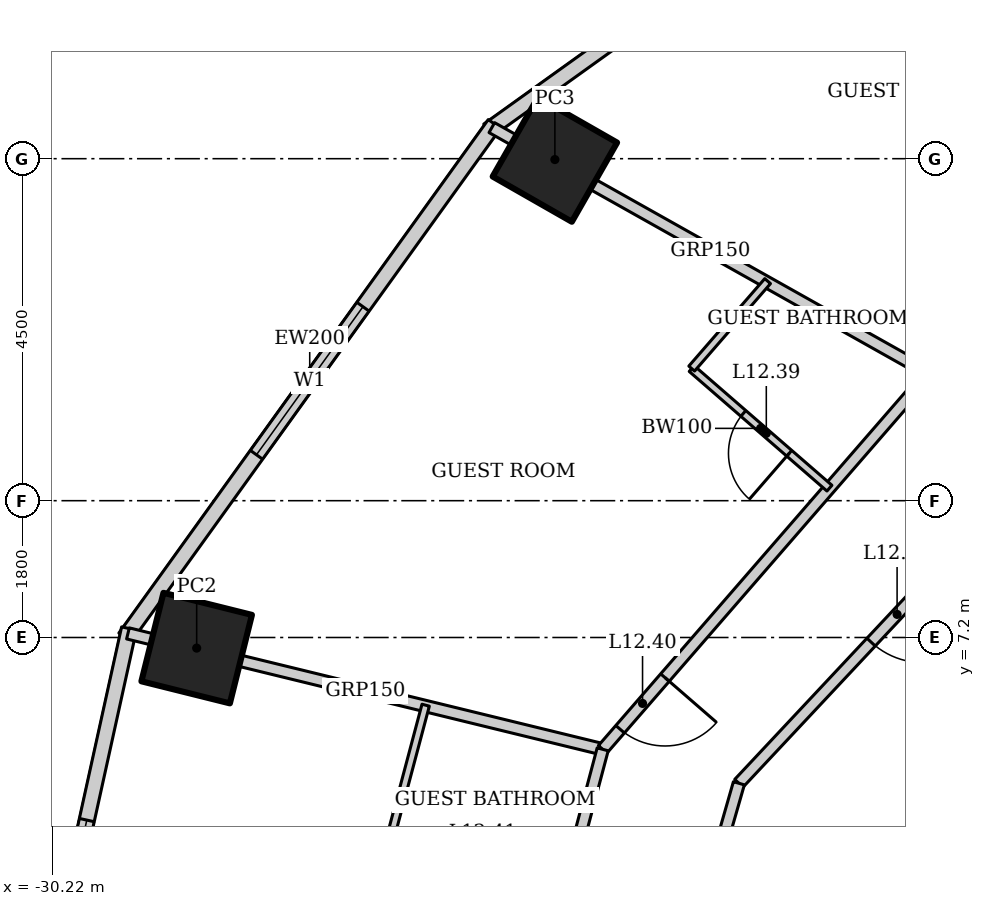
"""IFC4 building model, lengths in metres.
Left out: names, types, materials, properties, quantities, classifications, styles, units other than length and angle.
Written with IfcOpenShell. Run it as: python <this file> out.ifc"""

import sys

from ifc_helpers import new_model, si_unit, direction, frame, frame_2d, origin, origin_2d, place, context, subcontext, project, spatial, rectangle, hollow_rectangle, extrude, element, fill, save


model = new_model("IFC4")
c1 = context("Model", 3, precision=1e-05, world=origin(), true_north=direction((0.0, 1.0)))
c2 = subcontext(c1, "Body", "Model", "MODEL_VIEW")
j1 = project(units=[si_unit("LENGTHUNIT", "METRE"), si_unit("PLANEANGLEUNIT", "RADIAN")], contexts=[c1])
p1 = place(None, origin())
s1 = spatial("IfcSite", under=j1, at=p1, CompositionType="ELEMENT")
p2 = place(p1, origin())
s2 = spatial("IfcBuilding", under=s1, at=p2, CompositionType="ELEMENT")
p3 = place(p2, frame((0.0, 0.0, 58.6)))
s3 = spatial("IfcBuildingStorey", under=s2, at=p3, CompositionType="ELEMENT", Elevation=58.6)
p4 = place(p3, frame((-23.605, 13.489, 0.0), z_axis=(0.0, 0.0, 1.0), x_axis=(0.496139221777, 0.86824298017, 0.0)))
e1 = element("IfcColumn", 1, at=p4, inside=s3, PredefinedType="COLUMN", context=c2, shape_type="SweptSolid", body=[
    extrude(hollow_rectangle(XDim=1.2, YDim=1.2, WallThickness=0.12, at=origin_2d()), origin(), (0.0, 0.0, 1.0), 3.6),
])
p5 = place(p3, frame((-28.318, 7.06, 0.0), z_axis=(0.0, 0.0, 1.0), x_axis=(0.2419218956, 0.970295726276, 0.0)))
e2 = element("IfcColumn", 2, at=p5, inside=s3, PredefinedType="COLUMN", context=c2, shape_type="SweptSolid", body=[
    extrude(hollow_rectangle(XDim=1.2, YDim=1.2, WallThickness=0.1, at=origin_2d()), origin(), (0.0, 0.0, 1.0), 3.6),
])
p6 = place(p3, frame((-17.929, 18.572, 0.0), z_axis=(0.0, 0.0, 1.0), x_axis=(-0.812791321576, -0.582554948112, 0.0)))
e3 = element("IfcWall", 3, at=p6, inside=s3, PredefinedType="SOLIDWALL", context=c2, shape_type="SweptSolid", body=[
    extrude(rectangle(XDim=8.063, YDim=0.2, at=frame_2d((4.032, 0.0))), origin(), (0.0, 0.0, 1.0), 3.45),
])
p7 = place(p6, frame((2.832, 0.0, 0.5)))
e4 = element("IfcOpeningElement", 4, at=p7, cuts=e3, PredefinedType="OPENING", context=c2, shape_type="SweptSolid", body=[
    extrude(rectangle(XDim=2.4, YDim=2.2, at=frame_2d((1.2, 1.1))), frame((0.0, 0.11, 0.0), z_axis=(0.0, -1.0, 0.0), x_axis=(1.0, 0.0, 0.0)), (0.0, 0.0, 1.0), 0.22),
])
p8 = place(p3, frame((-24.4, 13.957, 0.0), z_axis=(0.0, 0.0, 1.0), x_axis=(-0.583937613703, -0.811798536155, 0.0)))
e5 = element("IfcWall", 5, at=p8, inside=s3, PredefinedType="SOLIDWALL", context=c2, shape_type="SweptSolid", body=[
    extrude(rectangle(XDim=8.323, YDim=0.2, at=frame_2d((4.162, 0.0))), origin(), (0.0, 0.0, 1.0), 3.45),
])
p9 = place(p8, frame((2.961, 0.0, 0.5)))
e6 = element("IfcOpeningElement", 6, at=p9, cuts=e5, PredefinedType="OPENING", context=c2, shape_type="SweptSolid", body=[
    extrude(rectangle(XDim=2.4, YDim=2.2, at=frame_2d((1.2, 1.1))), frame((0.0, 0.11, 0.0), z_axis=(0.0, -1.0, 0.0), x_axis=(1.0, 0.0, 0.0)), (0.0, 0.0, 1.0), 0.22),
])
p10 = place(p3, frame((-29.208, 7.318, 0.0), z_axis=(0.0, 0.0, 1.0), x_axis=(-0.215238065514, -0.976561608478, 0.0)))
e7 = element("IfcWall", 7, at=p10, inside=s3, PredefinedType="SOLIDWALL", context=c2, shape_type="SweptSolid", body=[
    extrude(rectangle(XDim=7.562, YDim=0.2, at=frame_2d((3.781, 0.0))), origin(), (0.0, 0.0, 1.0), 3.45),
])
p11 = place(p10, frame((2.581, 0.0, 0.5)))
e8 = element("IfcOpeningElement", 8, at=p11, cuts=e7, PredefinedType="OPENING", context=c2, shape_type="SweptSolid", body=[
    extrude(rectangle(XDim=2.4, YDim=2.2, at=frame_2d((1.2, 1.1))), frame((0.0, 0.11, 0.0), z_axis=(0.0, -1.0, 0.0), x_axis=(1.0, 0.0, 0.0)), (0.0, 0.0, 1.0), 0.22),
])
p12 = place(p3, frame((-24.435, 13.909, 0.0), z_axis=(0.0, 0.0, 1.0), x_axis=(0.871747379892, -0.489955616001, 0.0)))
e9 = element("IfcWall", 9, at=p12, inside=s3, PredefinedType="PARTITIONING", context=c2, shape_type="SweptSolid", body=[
    extrude(rectangle(XDim=6.6, YDim=0.15, at=frame_2d((3.3, 0.0))), origin(), (0.0, 0.0, 1.0), 2.693),
])
p13 = place(p3, frame((-29.222, 7.254, 0.0), z_axis=(0.0, 0.0, 1.0), x_axis=(0.971456980633, -0.237215797913, 0.0)))
e10 = element("IfcWall", 10, at=p13, inside=s3, PredefinedType="PARTITIONING", context=c2, shape_type="SweptSolid", body=[
    extrude(rectangle(XDim=6.429, YDim=0.15, at=frame_2d((3.215, 0.0))), origin(), (0.0, 0.0, 1.0), 2.332),
])
p14 = place(p3, frame((-18.681, 10.675, 0.0), z_axis=(0.0, 0.0, 1.0), x_axis=(-0.655599989166, -0.755108372491, 0.0)))
e11 = element("IfcWall", 11, at=p14, inside=s3, PredefinedType="PARTITIONING", context=c2, shape_type="SweptSolid", body=[
    extrude(rectangle(XDim=6.551, YDim=0.15, at=frame_2d((3.275, 0.0))), origin(), (0.0, 0.0, 1.0), 3.45),
])
p15 = place(p14, frame((5.301, 0.0, 0.0)))
e12 = element("IfcOpeningElement", 12, at=p15, cuts=e11, PredefinedType="OPENING", context=c2, shape_type="SweptSolid", body=[
    extrude(rectangle(XDim=0.9, YDim=2.1, at=frame_2d((0.45, 1.05))), frame((0.0, 0.085, 0.0), z_axis=(0.0, -1.0, 0.0), x_axis=(1.0, 0.0, 0.0)), (0.0, 0.0, 1.0), 0.17),
])
p16 = place(p3, frame((-22.976, 5.729, 0.0), z_axis=(0.0, 0.0, 1.0), x_axis=(-0.257083265334, -0.966389256296, 0.0)))
e13 = element("IfcWall", 13, at=p16, inside=s3, PredefinedType="PARTITIONING", context=c2, shape_type="SweptSolid", body=[
    extrude(rectangle(XDim=5.928, YDim=0.15, at=frame_2d((2.964, 0.0))), origin(), (0.0, 0.0, 1.0), 3.45),
])
p17 = place(p16, frame((4.023, 0.0, 0.0)))
e14 = element("IfcOpeningElement", 14, at=p17, cuts=e13, PredefinedType="OPENING", context=c2, shape_type="SweptSolid", body=[
    extrude(rectangle(XDim=0.9, YDim=2.1, at=frame_2d((0.45, 1.05))), frame((0.0, 0.085, 0.0), z_axis=(0.0, -1.0, 0.0), x_axis=(1.0, 0.0, 0.0)), (0.0, 0.0, 1.0), 0.17),
])
p18 = place(p3, frame((-17.021, 9.726, 0.0), z_axis=(0.0, 0.0, 1.0), x_axis=(-0.68365836236, -0.729802194828, 0.0)))
e15 = element("IfcWall", 15, at=p18, inside=s3, PredefinedType="PARTITIONING", context=c2, shape_type="SweptSolid", body=[
    extrude(rectangle(XDim=6.09, YDim=0.15, at=frame_2d((3.045, 0.0))), origin(), (0.0, 0.0, 1.0), 3.45),
])
p19 = place(p18, frame((2.545, 0.0, 0.0)))
e16 = element("IfcOpeningElement", 16, at=p19, cuts=e15, PredefinedType="OPENING", context=c2, shape_type="SweptSolid", body=[
    extrude(rectangle(XDim=1.0, YDim=2.1, at=frame_2d((0.5, 1.05))), frame((0.0, 0.085, 0.0), z_axis=(0.0, -1.0, 0.0), x_axis=(1.0, 0.0, 0.0)), (0.0, 0.0, 1.0), 0.17),
])
p20 = place(p3, frame((-21.184, 5.282, 0.0), z_axis=(0.0, 0.0, 1.0), x_axis=(-0.27585972825, -0.961197903831, 0.0)))
e17 = element("IfcWall", 17, at=p20, inside=s3, PredefinedType="PARTITIONING", context=c2, shape_type="SweptSolid", body=[
    extrude(rectangle(XDim=4.559, YDim=0.15, at=frame_2d((2.279, 0.0))), origin(), (0.0, 0.0, 1.0), 3.45),
])
p21 = place(p3, frame((-19.993, 9.165, 0.0), z_axis=(0.0, 0.0, 1.0), x_axis=(-0.755098052661, 0.655611875172, 0.0)))
e18 = element("IfcWall", 18, at=p21, inside=s3, PredefinedType="PARTITIONING", context=c2, shape_type="SweptSolid", body=[
    extrude(rectangle(XDim=2.4, YDim=0.1, at=frame_2d((1.2, 0.0))), origin(), (0.0, 0.0, 1.0), 3.45),
])
p22 = place(p21, frame((0.7, 0.0, 0.0)))
e19 = element("IfcOpeningElement", 19, at=p22, cuts=e18, PredefinedType="OPENING", context=c2, shape_type="SweptSolid", body=[
    extrude(rectangle(XDim=0.8, YDim=2.1, at=frame_2d((0.4, 1.05))), frame((0.0, 0.06, 0.0), z_axis=(0.0, -1.0, 0.0), x_axis=(1.0, 0.0, 0.0)), (0.0, 0.0, 1.0), 0.12),
])
p23 = place(p3, frame((-21.805, 10.738, 0.0), z_axis=(0.0, 0.0, 1.0), x_axis=(0.655528024617, 0.755170847518, 0.0)))
e20 = element("IfcWall", 20, at=p23, inside=s3, PredefinedType="PARTITIONING", context=c2, shape_type="SweptSolid", body=[
    extrude(rectangle(XDim=1.524, YDim=0.1, at=frame_2d((0.762, 0.0))), origin(), (0.0, 0.0, 1.0), 3.45),
])
p24 = place(p3, frame((-25.81, 4.413, 0.0), z_axis=(0.0, 0.0, 1.0), x_axis=(0.257143831715, 0.96637314212, 0.0)))
e21 = element("IfcWall", 21, at=p24, inside=s3, PredefinedType="PARTITIONING", context=c2, shape_type="SweptSolid", body=[
    extrude(rectangle(XDim=1.962, YDim=0.1, at=frame_2d((0.981, 0.0))), origin(), (0.0, 0.0, 1.0), 3.45),
])
p25 = place(p9, origin())
e22 = element("IfcWindow", 22, at=p25, inside=s3, PartitioningType="SINGLE_PANEL", PredefinedType="WINDOW", context=c2, shape_type="SweptSolid", body=[
    extrude(rectangle(XDim=2.4, YDim=2.2, at=frame_2d((1.2, 1.1))), frame((0.0, 0.03, 0.0), z_axis=(0.0, -1.0, 0.0), x_axis=(1.0, 0.0, 0.0)), (0.0, 0.0, 1.0), 0.06),
])
fill(e6, e22)
p26 = place(p11, origin())
e23 = element("IfcWindow", 23, at=p26, inside=s3, PartitioningType="SINGLE_PANEL", PredefinedType="WINDOW", context=c2, shape_type="SweptSolid", body=[
    extrude(rectangle(XDim=2.4, YDim=2.2, at=frame_2d((1.2, 1.1))), frame((0.0, 0.03, 0.0), z_axis=(0.0, -1.0, 0.0), x_axis=(1.0, 0.0, 0.0)), (0.0, 0.0, 1.0), 0.06),
])
fill(e8, e23)
p27 = place(p19, origin())
e24 = element("IfcDoor", 24, at=p27, inside=s3, OperationType="SINGLE_SWING_LEFT", PredefinedType="DOOR", context=c2, shape_type="SweptSolid", body=[
    extrude(rectangle(XDim=1.0, YDim=2.1, at=frame_2d((0.5, 1.05))), frame((0.0, 0.025, 0.0), z_axis=(0.0, -1.0, 0.0), x_axis=(1.0, 0.0, 0.0)), (0.0, 0.0, 1.0), 0.05),
])
fill(e16, e24)
p28 = place(p22, origin())
e25 = element("IfcDoor", 25, at=p28, inside=s3, OperationType="SINGLE_SWING_LEFT", PredefinedType="DOOR", context=c2, shape_type="SweptSolid", body=[
    extrude(rectangle(XDim=0.8, YDim=2.1, at=frame_2d((0.4, 1.05))), frame((0.0, 0.025, 0.0), z_axis=(0.0, -1.0, 0.0), x_axis=(1.0, 0.0, 0.0)), (0.0, 0.0, 1.0), 0.05),
])
fill(e19, e25)
p29 = place(p15, origin())
e26 = element("IfcDoor", 26, at=p29, inside=s3, OperationType="SINGLE_SWING_LEFT", PredefinedType="DOOR", context=c2, shape_type="SweptSolid", body=[
    extrude(rectangle(XDim=0.9, YDim=2.1, at=frame_2d((0.45, 1.05))), frame((0.0, 0.025, 0.0), z_axis=(0.0, -1.0, 0.0), x_axis=(1.0, 0.0, 0.0)), (0.0, 0.0, 1.0), 0.05),
])
fill(e12, e26)
save(model, sys.argv[1])
